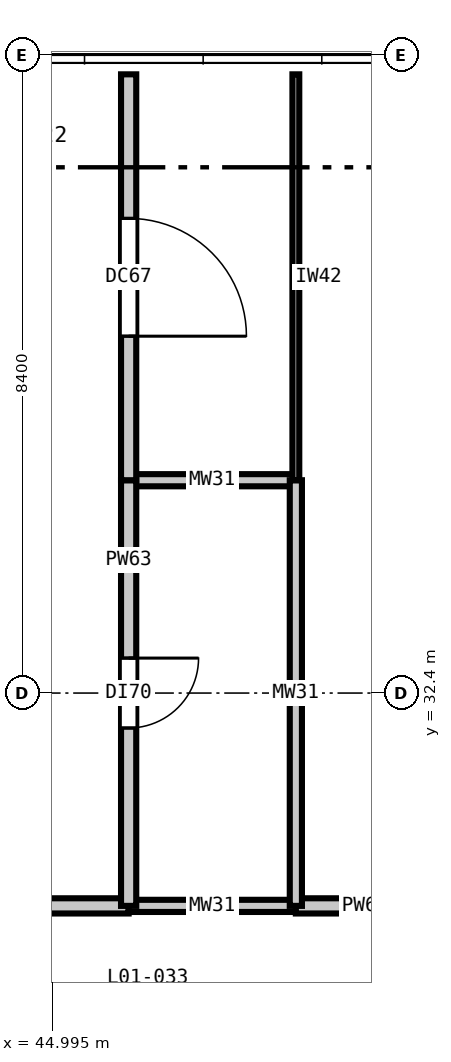
"""IFC4 building model, lengths in metres.
Left out: names, types, materials, properties, quantities, classifications, styles, units other than length and angle.
Written with IfcOpenShell. Run it as: python <this file> out.ifc"""

import sys

from ifc_helpers import new_model, si_unit, direction, frame, frame_2d, origin, place, context, subcontext, project, spatial, rectangle, extrude, element, fill, save


model = new_model("IFC4")
c1 = context("Model", 3, precision=1e-05, world=origin(), true_north=direction((0.0, 1.0)))
c2 = subcontext(c1, "Body", "Model", "MODEL_VIEW")
j1 = project(units=[si_unit("LENGTHUNIT", "METRE"), si_unit("PLANEANGLEUNIT", "RADIAN")], contexts=[c1])
p1 = place(None, origin())
s1 = spatial("IfcSite", under=j1, at=p1, CompositionType="ELEMENT")
p2 = place(p1, origin())
s2 = spatial("IfcBuilding", under=s1, at=p2, CompositionType="ELEMENT")
p3 = place(p2, frame((0.0, 0.0, 5.4)))
s3 = spatial("IfcBuildingStorey", under=s2, at=p3, CompositionType="ELEMENT", Elevation=5.4)
p4 = place(p3, frame((41.2, 29.6, 0.0), z_axis=(0.0, 0.0, 1.0), x_axis=(1.0, 0.0, 0.0)))
e1 = element("IfcWall", 1, at=p4, inside=s3, PredefinedType="PARTITIONING", context=c2, shape_type="SweptSolid", body=[
    extrude(rectangle(XDim=4.8, YDim=0.2, at=frame_2d((2.4, 0.0))), origin(), (0.0, 0.0, 1.0), 5.05),
])
p5 = place(p4, frame((1.725, 0.0, 0.0)))
e2 = element("IfcOpeningElement", 2, at=p5, cuts=e1, PredefinedType="OPENING", context=c2, shape_type="SweptSolid", body=[
    extrude(rectangle(XDim=1.35, YDim=2.2, at=frame_2d((0.675, 1.1))), frame((0.0, 0.11, 0.0), z_axis=(0.0, -1.0, 0.0), x_axis=(1.0, 0.0, 0.0)), (0.0, 0.0, 1.0), 0.22),
])
p6 = place(p3, frame((46.0, 29.6, 0.0), z_axis=(0.0, 0.0, 1.0), x_axis=(1.0, 0.0, 0.0)))
e3 = element("IfcWall", 3, at=p6, inside=s3, PredefinedType="PLUMBINGWALL", context=c2, shape_type="SweptSolid", body=[
    extrude(rectangle(XDim=2.2, YDim=0.16, at=frame_2d((1.1, 0.0))), origin(), (0.0, 0.0, 1.0), 5.05),
])
p7 = place(p3, frame((48.2, 29.6, 0.0), z_axis=(0.0, 0.0, 1.0), x_axis=(1.0, 0.0, 0.0)))
e4 = element("IfcWall", 4, at=p7, inside=s3, PredefinedType="PARTITIONING", context=c2, shape_type="SweptSolid", body=[
    extrude(rectangle(XDim=5.6, YDim=0.2, at=frame_2d((2.8, 0.0))), origin(), (0.0, 0.0, 1.0), 5.05),
])
p8 = place(p7, frame((2.075, 0.0, 0.0)))
e5 = element("IfcOpeningElement", 5, at=p8, cuts=e4, PredefinedType="OPENING", context=c2, shape_type="SweptSolid", body=[
    extrude(rectangle(XDim=1.45, YDim=2.25, at=frame_2d((0.725, 1.125))), frame((0.0, 0.11, 0.0), z_axis=(0.0, -1.0, 0.0), x_axis=(1.0, 0.0, 0.0)), (0.0, 0.0, 1.0), 0.22),
])
p9 = place(p3, frame((46.0, 35.2, 0.0), z_axis=(0.0, 0.0, 1.0), x_axis=(1.0, 0.0, 0.0)))
e6 = element("IfcWall", 6, at=p9, inside=s3, PredefinedType="PLUMBINGWALL", context=c2, shape_type="SweptSolid", body=[
    extrude(rectangle(XDim=2.2, YDim=0.16, at=frame_2d((1.1, 0.0))), origin(), (0.0, 0.0, 1.0), 5.05),
])
p10 = place(p3, frame((46.0, 29.6, 0.0), z_axis=(0.0, 0.0, 1.0), x_axis=(0.0, 1.0, 0.0)))
e7 = element("IfcWall", 7, at=p10, inside=s3, PredefinedType="PARTITIONING", context=c2, shape_type="SweptSolid", body=[
    extrude(rectangle(XDim=5.6, YDim=0.2, at=frame_2d((2.8, 0.0))), origin(), (0.0, 0.0, 1.0), 5.05),
])
p11 = place(p10, frame((2.34, 0.0, 0.0)))
e8 = element("IfcOpeningElement", 8, at=p11, cuts=e7, PredefinedType="OPENING", context=c2, shape_type="SweptSolid", body=[
    extrude(rectangle(XDim=0.92, YDim=2.1, at=frame_2d((0.46, 1.05))), frame((0.0, 0.11, 0.0), z_axis=(0.0, -1.0, 0.0), x_axis=(1.0, 0.0, 0.0)), (0.0, 0.0, 1.0), 0.22),
])
p12 = place(p3, frame((46.0, 35.2, 0.0), z_axis=(0.0, 0.0, 1.0), x_axis=(0.0, 1.0, 0.0)))
e9 = element("IfcWall", 9, at=p12, inside=s3, PredefinedType="PARTITIONING", context=c2, shape_type="SweptSolid", body=[
    extrude(rectangle(XDim=5.34, YDim=0.2, at=frame_2d((2.67, 0.0))), origin(), (0.0, 0.0, 1.0), 5.05),
])
p13 = place(p12, frame((1.895, 0.0, 0.0)))
e10 = element("IfcOpeningElement", 10, at=p13, cuts=e9, PredefinedType="OPENING", context=c2, shape_type="SweptSolid", body=[
    extrude(rectangle(XDim=1.55, YDim=2.25, at=frame_2d((0.775, 1.125))), frame((0.0, 0.11, 0.0), z_axis=(0.0, -1.0, 0.0), x_axis=(1.0, 0.0, 0.0)), (0.0, 0.0, 1.0), 0.22),
])
p14 = place(p3, frame((48.2, 29.6, 0.0), z_axis=(0.0, 0.0, 1.0), x_axis=(0.0, 1.0, 0.0)))
e11 = element("IfcWall", 11, at=p14, inside=s3, PredefinedType="PLUMBINGWALL", context=c2, shape_type="SweptSolid", body=[
    extrude(rectangle(XDim=5.6, YDim=0.16, at=frame_2d((2.8, 0.0))), origin(), (0.0, 0.0, 1.0), 5.05),
])
p15 = place(p3, frame((48.2, 35.2, 0.0), z_axis=(0.0, 0.0, 1.0), x_axis=(0.0, 1.0, 0.0)))
e12 = element("IfcWall", 12, at=p15, inside=s3, PredefinedType="PARTITIONING", context=c2, shape_type="SweptSolid", body=[
    extrude(rectangle(XDim=5.34, YDim=0.09, at=frame_2d((2.67, 0.0))), origin(), (0.0, 0.0, 1.0), 5.05),
])
p16 = place(p11, frame((0.92, 0.0, 0.0), z_axis=(0.0, 0.0, 1.0), x_axis=(-1.0, 0.0, 0.0)))
e13 = element("IfcDoor", 13, at=p16, inside=s3, OperationType="SINGLE_SWING_LEFT", PredefinedType="DOOR", context=c2, shape_type="SweptSolid", body=[
    extrude(rectangle(XDim=0.92, YDim=2.1, at=frame_2d((0.46, 1.05))), frame((0.0, 0.025, 0.0), z_axis=(0.0, -1.0, 0.0), x_axis=(1.0, 0.0, 0.0)), (0.0, 0.0, 1.0), 0.05),
])
fill(e8, e13)
p17 = place(p13, frame((1.55, 0.0, 0.0), z_axis=(0.0, 0.0, 1.0), x_axis=(-1.0, 0.0, 0.0)))
e14 = element("IfcDoor", 14, at=p17, inside=s3, OperationType="SINGLE_SWING_RIGHT", PredefinedType="DOOR", context=c2, shape_type="SweptSolid", body=[
    extrude(rectangle(XDim=1.55, YDim=2.25, at=frame_2d((0.775, 1.125))), frame((0.0, 0.025, 0.0), z_axis=(0.0, -1.0, 0.0), x_axis=(1.0, 0.0, 0.0)), (0.0, 0.0, 1.0), 0.05),
])
fill(e10, e14)
save(model, sys.argv[1])
